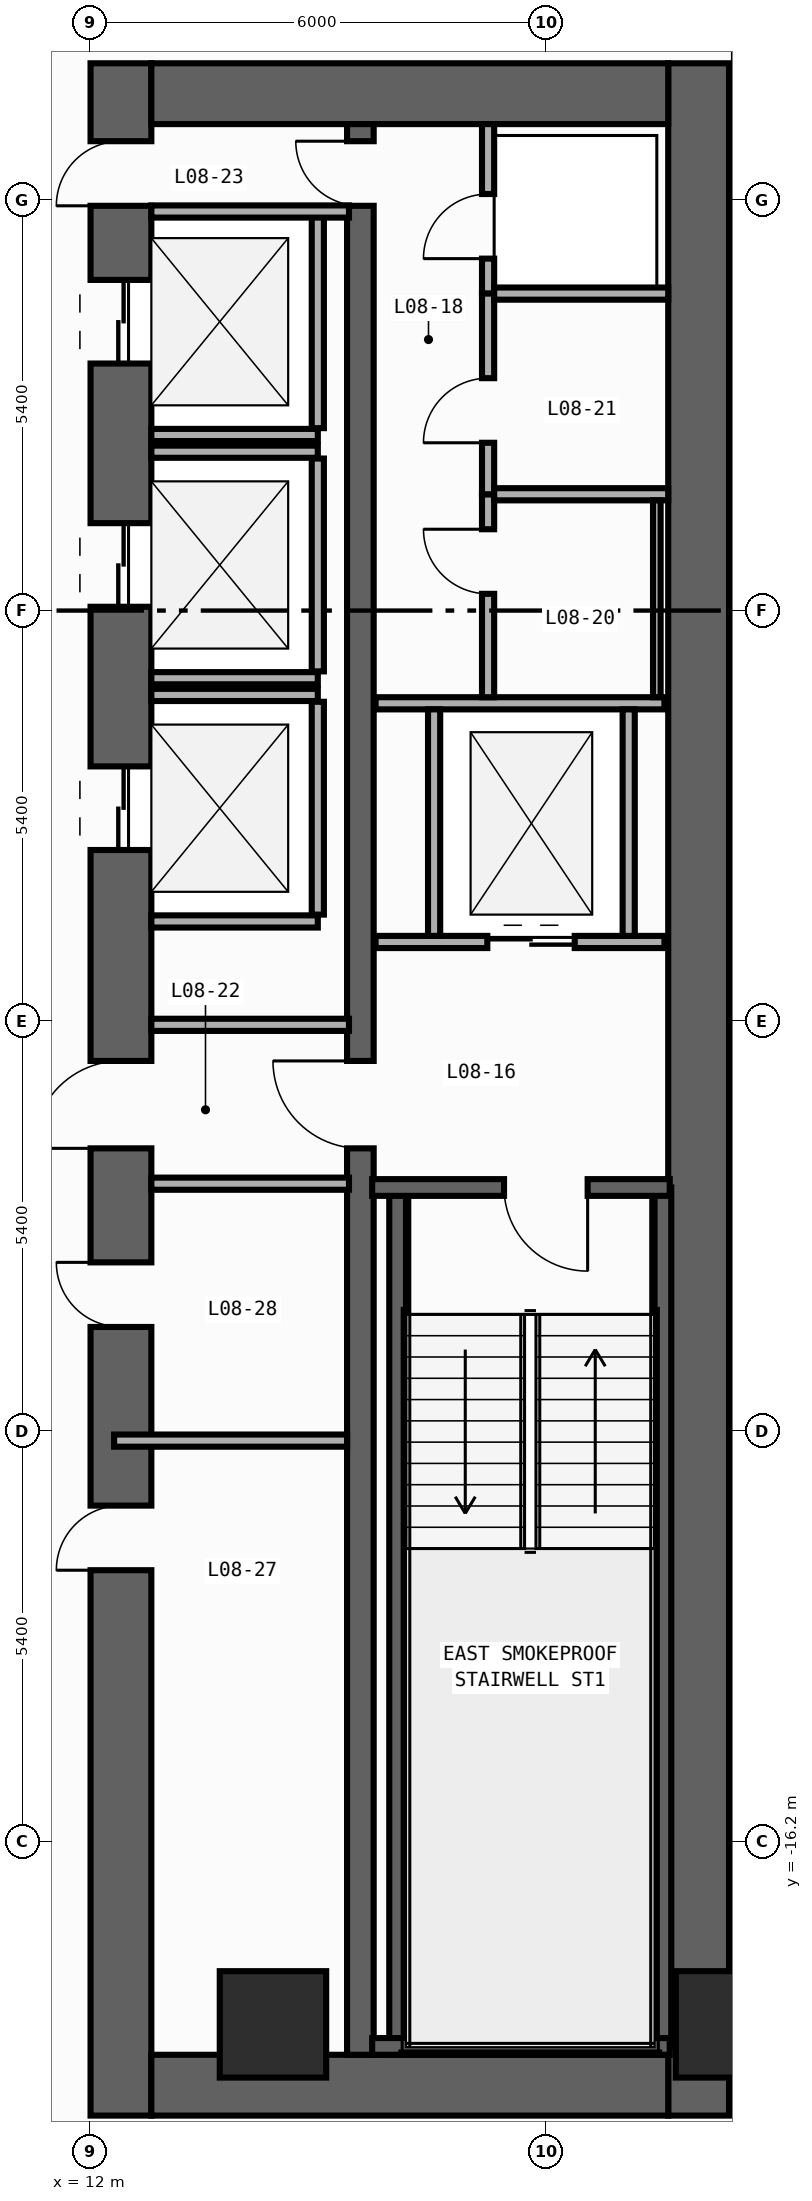
"""IFC4 building model, lengths in metres.
Left out: names, types, materials, properties, quantities, classifications, styles, units other than length and angle.
Written with IfcOpenShell. Run it as: python <this file> out.ifc"""

import sys

from ifc_helpers import new_model, si_unit, direction, frame, frame_2d, origin, origin_2d, place, context, subcontext, project, spatial, rectangle, extrude, element, fill, save


model = new_model("IFC4")
c1 = context("Model", 3, precision=1e-05, world=origin(), true_north=direction((0.0, 1.0)))
c2 = subcontext(c1, "Body", "Model", "MODEL_VIEW")
j1 = project(units=[si_unit("LENGTHUNIT", "METRE"), si_unit("PLANEANGLEUNIT", "RADIAN")], contexts=[c1])
p1 = place(None, origin())
s1 = spatial("IfcSite", under=j1, at=p1, CompositionType="ELEMENT")
p2 = place(p1, origin())
s2 = spatial("IfcBuilding", under=s1, at=p2, CompositionType="ELEMENT")
p3 = place(p2, frame((0.0, 0.0, 34.4)))
s3 = spatial("IfcBuildingStorey", under=s2, at=p3, CompositionType="ELEMENT", Elevation=34.4)
p4 = place(p3, frame((12.4, -19.8, 0.0), z_axis=(0.0, 0.0, 1.0), x_axis=(0.0, 1.0, 0.0)))
e1 = element("IfcWall", 1, at=p4, inside=s3, PredefinedType="SHEAR", context=c2, shape_type="SweptSolid", body=[
    extrude(rectangle(XDim=27.0, YDim=0.8, at=frame_2d((13.5, 0.0))), origin(), (0.0, 0.0, 1.0), 3.94),
])
p5 = place(p4, frame((23.05, 0.0, 0.0)))
e2 = element("IfcOpeningElement", 2, at=p5, cuts=e1, PredefinedType="OPENING", context=c2, shape_type="SweptSolid", body=[
    extrude(rectangle(XDim=1.1, YDim=2.2, at=frame_2d((0.55, 1.1))), frame((0.0, 0.41, 0.0), z_axis=(0.0, -1.0, 0.0), x_axis=(1.0, 0.0, 0.0)), (0.0, 0.0, 1.0), 0.82),
])
p6 = place(p4, frame((19.85, 0.0, 0.0)))
e3 = element("IfcOpeningElement", 3, at=p6, cuts=e1, PredefinedType="OPENING", context=c2, shape_type="SweptSolid", body=[
    extrude(rectangle(XDim=1.1, YDim=2.2, at=frame_2d((0.55, 1.1))), frame((0.0, 0.41, 0.0), z_axis=(0.0, -1.0, 0.0), x_axis=(1.0, 0.0, 0.0)), (0.0, 0.0, 1.0), 0.82),
])
p7 = place(p4, frame((16.65, 0.0, 0.0)))
e4 = element("IfcOpeningElement", 4, at=p7, cuts=e1, PredefinedType="OPENING", context=c2, shape_type="SweptSolid", body=[
    extrude(rectangle(XDim=1.1, YDim=2.2, at=frame_2d((0.55, 1.1))), frame((0.0, 0.41, 0.0), z_axis=(0.0, -1.0, 0.0), x_axis=(1.0, 0.0, 0.0)), (0.0, 0.0, 1.0), 0.82),
])
p8 = place(p4, frame((7.175, 0.0, 0.0)))
e5 = element("IfcOpeningElement", 5, at=p8, cuts=e1, PredefinedType="OPENING", context=c2, shape_type="SweptSolid", body=[
    extrude(rectangle(XDim=0.85, YDim=2.1, at=frame_2d((0.425, 1.05))), frame((0.0, 0.41, 0.0), z_axis=(0.0, -1.0, 0.0), x_axis=(1.0, 0.0, 0.0)), (0.0, 0.0, 1.0), 0.82),
])
p9 = place(p4, frame((10.375, 0.0, 0.0)))
e6 = element("IfcOpeningElement", 6, at=p9, cuts=e1, PredefinedType="OPENING", context=c2, shape_type="SweptSolid", body=[
    extrude(rectangle(XDim=0.85, YDim=2.1, at=frame_2d((0.425, 1.05))), frame((0.0, 0.41, 0.0), z_axis=(0.0, -1.0, 0.0), x_axis=(1.0, 0.0, 0.0)), (0.0, 0.0, 1.0), 0.82),
])
p10 = place(p4, frame((12.725, 0.0, 0.0)))
e7 = element("IfcOpeningElement", 7, at=p10, cuts=e1, PredefinedType="OPENING", context=c2, shape_type="SweptSolid", body=[
    extrude(rectangle(XDim=1.15, YDim=2.2, at=frame_2d((0.575, 1.1))), frame((0.0, 0.41, 0.0), z_axis=(0.0, -1.0, 0.0), x_axis=(1.0, 0.0, 0.0)), (0.0, 0.0, 1.0), 0.82),
])
p11 = place(p4, frame((25.125, 0.0, 0.0)))
e8 = element("IfcOpeningElement", 8, at=p11, cuts=e1, PredefinedType="OPENING", context=c2, shape_type="SweptSolid", body=[
    extrude(rectangle(XDim=0.85, YDim=2.1, at=frame_2d((0.425, 1.05))), frame((0.0, 0.41, 0.0), z_axis=(0.0, -1.0, 0.0), x_axis=(1.0, 0.0, 0.0)), (0.0, 0.0, 1.0), 0.82),
])
p12 = place(p3, frame((20.0, -19.8, 0.0), z_axis=(0.0, 0.0, 1.0), x_axis=(0.0, 1.0, 0.0)))
e9 = element("IfcWall", 9, at=p12, inside=s3, PredefinedType="SHEAR", context=c2, shape_type="SweptSolid", body=[
    extrude(rectangle(XDim=27.0, YDim=0.8, at=frame_2d((13.5, 0.0))), origin(), (0.0, 0.0, 1.0), 3.94),
])
for number, where, z_axis, x_axis in (
    (10, (12.8, -19.4, 0.0), (0.0, 0.0, 1.0), (1.0, 0.0, 0.0)),
    (11, (12.8, 6.8, 0.0), (0.0, 0.0, 1.0), (1.0, 0.0, 0.0)),
):
    element("IfcWall", number, at=place(p3, frame(where, z_axis=z_axis, x_axis=x_axis)), inside=s3, PredefinedType="SHEAR", context=c2, shape_type="SweptSolid", body=[
        extrude(rectangle(XDim=6.8, YDim=0.8, at=frame_2d((3.4, 0.0))), origin(), (0.0, 0.0, 1.0), 3.94),
    ])
p13 = place(p3, frame((15.55, -19.0, 0.0), z_axis=(0.0, 0.0, 1.0), x_axis=(0.0, 1.0, 0.0)))
e12 = element("IfcWall", 12, at=p13, inside=s3, PredefinedType="SHEAR", context=c2, shape_type="SweptSolid", body=[
    extrude(rectangle(XDim=25.4, YDim=0.35, at=frame_2d((12.7, 0.0))), origin(), (0.0, 0.0, 1.0), 3.94),
])
p14 = place(p13, frame((11.925, 0.0, 0.0)))
e13 = element("IfcOpeningElement", 13, at=p14, cuts=e12, PredefinedType="OPENING", context=c2, shape_type="SweptSolid", body=[
    extrude(rectangle(XDim=1.15, YDim=2.2, at=frame_2d((0.575, 1.1))), frame((0.0, 0.185, 0.0), z_axis=(0.0, -1.0, 0.0), x_axis=(1.0, 0.0, 0.0)), (0.0, 0.0, 1.0), 0.37),
])
p15 = place(p13, frame((24.325, 0.0, 0.0)))
e14 = element("IfcOpeningElement", 14, at=p15, cuts=e12, PredefinedType="OPENING", context=c2, shape_type="SweptSolid", body=[
    extrude(rectangle(XDim=0.85, YDim=2.1, at=frame_2d((0.425, 1.05))), frame((0.0, 0.185, 0.0), z_axis=(0.0, -1.0, 0.0), x_axis=(1.0, 0.0, 0.0)), (0.0, 0.0, 1.0), 0.37),
])
for number, where, z_axis, x_axis in (
    (15, (16.04, -18.89, 0.0), (0.0, 0.0, 1.0), (0.0, 1.0, 0.0)),
    (16, (19.53, -18.89, 0.0), (0.0, 0.0, 1.0), (0.0, 1.0, 0.0)),
):
    element("IfcWall", number, at=place(p3, frame(where, z_axis=z_axis, x_axis=x_axis)), inside=s3, PredefinedType="SHEAR", context=c2, shape_type="SweptSolid", body=[
        extrude(rectangle(XDim=11.3, YDim=0.22, at=frame_2d((5.65, 0.0))), origin(), (0.0, 0.0, 1.0), 3.94),
    ])
p16 = place(p3, frame((15.705, -18.89, 0.0), z_axis=(0.0, 0.0, 1.0), x_axis=(1.0, 0.0, 0.0)))
e17 = element("IfcWall", 17, at=p16, inside=s3, PredefinedType="SHEAR", context=c2, shape_type="SweptSolid", body=[
    extrude(rectangle(XDim=3.915, YDim=0.22, at=frame_2d((1.958, 0.0))), origin(), (0.0, 0.0, 1.0), 3.94),
])
p17 = place(p3, frame((19.62, -7.59, 0.0), z_axis=(0.0, 0.0, 1.0), x_axis=(-1.0, 0.0, 0.0)))
e18 = element("IfcWall", 18, at=p17, inside=s3, PredefinedType="SHEAR", context=c2, shape_type="SweptSolid", body=[
    extrude(rectangle(XDim=3.915, YDim=0.22, at=frame_2d((1.958, 0.0))), origin(), (0.0, 0.0, 1.0), 3.94),
])
p18 = place(p17, frame((1.08, 0.0, 0.0)))
e19 = element("IfcOpeningElement", 19, at=p18, cuts=e18, PredefinedType="OPENING", context=c2, shape_type="SweptSolid", body=[
    extrude(rectangle(XDim=1.1, YDim=2.2, at=frame_2d((0.55, 1.1))), frame((0.0, 0.12, 0.0), z_axis=(0.0, -1.0, 0.0), x_axis=(1.0, 0.0, 0.0)), (0.0, 0.0, 1.0), 0.24),
])
for number, where, z_axis, x_axis in (
    (20, (20.4, -18.6, 0.0), (0.0, 0.0, 1.0), (1.0, 0.0, 0.0)),
    (21, (14.4, -18.6, 0.0), (0.0, 0.0, 1.0), (1.0, 0.0, 0.0)),
):
    element("IfcColumn", number, at=place(p3, frame(where, z_axis=z_axis, x_axis=x_axis)), inside=s3, PredefinedType="COLUMN", context=c2, shape_type="SweptSolid", body=[
        extrude(rectangle(XDim=1.4, YDim=1.4, at=origin_2d()), origin(), (0.0, 0.0, 1.0), 4.2),
    ])
p19 = place(p3, frame((12.8, 2.31, 0.0), z_axis=(0.0, 0.0, 1.0), x_axis=(1.0, 0.0, 0.0)))
e22 = element("IfcWall", 22, at=p19, inside=s3, PredefinedType="STANDARD", context=c2, shape_type="SweptSolid", body=[
    extrude(rectangle(XDim=2.19, YDim=0.16, at=frame_2d((1.095, 0.0))), origin(), (0.0, 0.0, 1.0), 3.94),
])
p20 = place(p3, frame((14.99, 2.4, 0.0), z_axis=(0.0, 0.0, 1.0), x_axis=(0.0, 1.0, 0.0)))
e23 = element("IfcWall", 23, at=p20, inside=s3, PredefinedType="STANDARD", context=c2, shape_type="SweptSolid", body=[
    extrude(rectangle(XDim=2.8, YDim=0.16, at=frame_2d((1.4, 0.0))), origin(), (0.0, 0.0, 1.0), 3.94),
])
for number, where, z_axis, x_axis in (
    (24, (12.8, -0.89, 0.0), (0.0, 0.0, 1.0), (1.0, 0.0, 0.0)),
    (25, (12.8, 2.09, 0.0), (0.0, 0.0, 1.0), (1.0, 0.0, 0.0)),
):
    element("IfcWall", number, at=place(p3, frame(where, z_axis=z_axis, x_axis=x_axis)), inside=s3, PredefinedType="STANDARD", context=c2, shape_type="SweptSolid", body=[
        extrude(rectangle(XDim=2.19, YDim=0.16, at=frame_2d((1.095, 0.0))), origin(), (0.0, 0.0, 1.0), 3.94),
    ])
p21 = place(p3, frame((14.99, -0.8, 0.0), z_axis=(0.0, 0.0, 1.0), x_axis=(0.0, 1.0, 0.0)))
e26 = element("IfcWall", 26, at=p21, inside=s3, PredefinedType="STANDARD", context=c2, shape_type="SweptSolid", body=[
    extrude(rectangle(XDim=2.8, YDim=0.16, at=frame_2d((1.4, 0.0))), origin(), (0.0, 0.0, 1.0), 3.94),
])
for number, where, z_axis, x_axis in (
    (27, (12.8, -4.09, 0.0), (0.0, 0.0, 1.0), (1.0, 0.0, 0.0)),
    (28, (12.8, -1.11, 0.0), (0.0, 0.0, 1.0), (1.0, 0.0, 0.0)),
):
    element("IfcWall", number, at=place(p3, frame(where, z_axis=z_axis, x_axis=x_axis)), inside=s3, PredefinedType="STANDARD", context=c2, shape_type="SweptSolid", body=[
        extrude(rectangle(XDim=2.19, YDim=0.16, at=frame_2d((1.095, 0.0))), origin(), (0.0, 0.0, 1.0), 3.94),
    ])
p22 = place(p3, frame((14.99, -4.0, 0.0), z_axis=(0.0, 0.0, 1.0), x_axis=(0.0, 1.0, 0.0)))
e29 = element("IfcWall", 29, at=p22, inside=s3, PredefinedType="STANDARD", context=c2, shape_type="SweptSolid", body=[
    extrude(rectangle(XDim=2.8, YDim=0.16, at=frame_2d((1.4, 0.0))), origin(), (0.0, 0.0, 1.0), 3.94),
])
p23 = place(p3, frame((15.75, -4.36, 0.0), z_axis=(0.0, 0.0, 1.0), x_axis=(1.0, 0.0, 0.0)))
e30 = element("IfcWall", 30, at=p23, inside=s3, PredefinedType="STANDARD", context=c2, shape_type="SweptSolid", body=[
    extrude(rectangle(XDim=3.8, YDim=0.16, at=frame_2d((1.9, 0.0))), origin(), (0.0, 0.0, 1.0), 3.94),
])
p24 = place(p23, frame((1.47, 0.0, 0.0)))
e31 = element("IfcOpeningElement", 31, at=p24, cuts=e30, PredefinedType="OPENING", context=c2, shape_type="SweptSolid", body=[
    extrude(rectangle(XDim=1.15, YDim=2.2, at=frame_2d((0.575, 1.1))), frame((0.0, 0.09, 0.0), z_axis=(0.0, -1.0, 0.0), x_axis=(1.0, 0.0, 0.0)), (0.0, 0.0, 1.0), 0.18),
])
p25 = place(p3, frame((15.75, -1.22, 0.0), z_axis=(0.0, 0.0, 1.0), x_axis=(1.0, 0.0, 0.0)))
e32 = element("IfcWall", 32, at=p25, inside=s3, PredefinedType="STANDARD", context=c2, shape_type="SweptSolid", body=[
    extrude(rectangle(XDim=3.8, YDim=0.16, at=frame_2d((1.9, 0.0))), origin(), (0.0, 0.0, 1.0), 3.94),
])
for number, where, z_axis, x_axis in (
    (33, (16.52, -4.28, 0.0), (0.0, 0.0, 1.0), (0.0, 1.0, 0.0)),
    (34, (19.08, -4.28, 0.0), (0.0, 0.0, 1.0), (0.0, 1.0, 0.0)),
):
    element("IfcWall", number, at=place(p3, frame(where, z_axis=z_axis, x_axis=x_axis)), inside=s3, PredefinedType="STANDARD", context=c2, shape_type="SweptSolid", body=[
        extrude(rectangle(XDim=2.98, YDim=0.16, at=frame_2d((1.49, 0.0))), origin(), (0.0, 0.0, 1.0), 3.94),
    ])
for number, where, z_axis, x_axis in (
    (35, (12.8, -5.45, 0.0), (0.0, 0.0, 1.0), (1.0, 0.0, 0.0)),
    (36, (12.8, -7.54, 0.0), (0.0, 0.0, 1.0), (1.0, 0.0, 0.0)),
    (37, (12.8, 5.25, 0.0), (0.0, 0.0, 1.0), (1.0, 0.0, 0.0)),
):
    element("IfcWall", number, at=place(p3, frame(where, z_axis=z_axis, x_axis=x_axis)), inside=s3, PredefinedType="STANDARD", context=c2, shape_type="SweptSolid", body=[
        extrude(rectangle(XDim=2.6, YDim=0.16, at=frame_2d((1.3, 0.0))), origin(), (0.0, 0.0, 1.0), 3.94),
    ])
p26 = place(p3, frame((17.23, 4.17, 0.0), z_axis=(0.0, 0.0, 1.0), x_axis=(0.0, 1.0, 0.0)))
e38 = element("IfcWall", 38, at=p26, inside=s3, PredefinedType="PARTITIONING", context=c2, shape_type="SweptSolid", body=[
    extrude(rectangle(XDim=2.23, YDim=0.16, at=frame_2d((1.115, 0.0))), origin(), (0.0, 0.0, 1.0), 3.94),
])
p27 = place(p26, frame((0.46, 0.0, 0.0)))
e39 = element("IfcOpeningElement", 39, at=p27, cuts=e38, PredefinedType="OPENING", context=c2, shape_type="SweptSolid", body=[
    extrude(rectangle(XDim=0.85, YDim=2.1, at=frame_2d((0.425, 1.05))), frame((0.0, 0.09, 0.0), z_axis=(0.0, -1.0, 0.0), x_axis=(1.0, 0.0, 0.0)), (0.0, 0.0, 1.0), 0.18),
])
p28 = place(p3, frame((17.23, -1.14, 0.0), z_axis=(0.0, 0.0, 1.0), x_axis=(0.0, 1.0, 0.0)))
e40 = element("IfcWall", 40, at=p28, inside=s3, PredefinedType="PARTITIONING", context=c2, shape_type="SweptSolid", body=[
    extrude(rectangle(XDim=2.67, YDim=0.16, at=frame_2d((1.335, 0.0))), origin(), (0.0, 0.0, 1.0), 3.94),
])
p29 = place(p28, frame((1.36, 0.0, 0.0)))
e41 = element("IfcOpeningElement", 41, at=p29, cuts=e40, PredefinedType="OPENING", context=c2, shape_type="SweptSolid", body=[
    extrude(rectangle(XDim=0.85, YDim=2.1, at=frame_2d((0.425, 1.05))), frame((0.0, 0.09, 0.0), z_axis=(0.0, -1.0, 0.0), x_axis=(1.0, 0.0, 0.0)), (0.0, 0.0, 1.0), 0.18),
])
p30 = place(p3, frame((17.23, 1.53, 0.0), z_axis=(0.0, 0.0, 1.0), x_axis=(0.0, 1.0, 0.0)))
e42 = element("IfcWall", 42, at=p30, inside=s3, PredefinedType="PARTITIONING", context=c2, shape_type="SweptSolid", body=[
    extrude(rectangle(XDim=2.64, YDim=0.16, at=frame_2d((1.32, 0.0))), origin(), (0.0, 0.0, 1.0), 3.94),
])
p31 = place(p30, frame((0.677, 0.0, 0.0)))
e43 = element("IfcOpeningElement", 43, at=p31, cuts=e42, PredefinedType="OPENING", context=c2, shape_type="SweptSolid", body=[
    extrude(rectangle(XDim=0.85, YDim=2.1, at=frame_2d((0.425, 1.05))), frame((0.0, 0.09, 0.0), z_axis=(0.0, -1.0, 0.0), x_axis=(1.0, 0.0, 0.0)), (0.0, 0.0, 1.0), 0.18),
])
for number, where, z_axis, x_axis in (
    (44, (17.31, 4.17, 0.0), (0.0, 0.0, 1.0), (1.0, 0.0, 0.0)),
    (45, (17.31, 1.53, 0.0), (0.0, 0.0, 1.0), (1.0, 0.0, 0.0)),
):
    element("IfcWall", number, at=place(p3, frame(where, z_axis=z_axis, x_axis=x_axis)), inside=s3, PredefinedType="PARTITIONING", context=c2, shape_type="SweptSolid", body=[
        extrude(rectangle(XDim=2.29, YDim=0.16, at=frame_2d((1.145, 0.0))), origin(), (0.0, 0.0, 1.0), 3.94),
    ])
p32 = place(p3, frame((12.31, -10.92, 0.0), z_axis=(0.0, 0.0, 1.0), x_axis=(1.0, 0.0, 0.0)))
e46 = element("IfcWall", 46, at=p32, inside=s3, PredefinedType="PARTITIONING", context=c2, shape_type="SweptSolid", body=[
    extrude(rectangle(XDim=3.065, YDim=0.16, at=frame_2d((1.532, 0.0))), origin(), (0.0, 0.0, 1.0), 3.14),
])
p33 = place(p3, frame((19.45, 1.45, 0.0), z_axis=(0.0, 0.0, 1.0), x_axis=(0.0, -1.0, 0.0)))
e47 = element("IfcWall", 47, at=p33, inside=s3, PredefinedType="PARTITIONING", context=c2, shape_type="SweptSolid", body=[
    extrude(rectangle(XDim=2.59, YDim=0.1, at=frame_2d((1.295, 0.0))), origin(), (0.0, 0.0, 1.0), 3.94),
])
p34 = place(p18, origin())
e48 = element("IfcDoor", 48, at=p34, inside=s3, OperationType="SINGLE_SWING_LEFT", PredefinedType="DOOR", context=c2, shape_type="SweptSolid", body=[
    extrude(rectangle(XDim=1.1, YDim=2.2, at=frame_2d((0.55, 1.1))), frame((0.0, 0.025, 0.0), z_axis=(0.0, -1.0, 0.0), x_axis=(1.0, 0.0, 0.0)), (0.0, 0.0, 1.0), 0.05),
])
fill(e19, e48)
p35 = place(p5, origin())
e49 = element("IfcDoor", 49, at=p35, inside=s3, OperationType="DOUBLE_DOOR_SLIDING", PredefinedType="DOOR", context=c2, shape_type="SweptSolid", body=[
    extrude(rectangle(XDim=1.1, YDim=2.2, at=frame_2d((0.55, 1.1))), frame((0.0, 0.025, 0.0), z_axis=(0.0, -1.0, 0.0), x_axis=(1.0, 0.0, 0.0)), (0.0, 0.0, 1.0), 0.05),
])
fill(e2, e49)
p36 = place(p6, origin())
e50 = element("IfcDoor", 50, at=p36, inside=s3, OperationType="DOUBLE_DOOR_SLIDING", PredefinedType="DOOR", context=c2, shape_type="SweptSolid", body=[
    extrude(rectangle(XDim=1.1, YDim=2.2, at=frame_2d((0.55, 1.1))), frame((0.0, 0.025, 0.0), z_axis=(0.0, -1.0, 0.0), x_axis=(1.0, 0.0, 0.0)), (0.0, 0.0, 1.0), 0.05),
])
fill(e3, e50)
p37 = place(p7, origin())
e51 = element("IfcDoor", 51, at=p37, inside=s3, OperationType="DOUBLE_DOOR_SLIDING", PredefinedType="DOOR", context=c2, shape_type="SweptSolid", body=[
    extrude(rectangle(XDim=1.1, YDim=2.2, at=frame_2d((0.55, 1.1))), frame((0.0, 0.025, 0.0), z_axis=(0.0, -1.0, 0.0), x_axis=(1.0, 0.0, 0.0)), (0.0, 0.0, 1.0), 0.05),
])
fill(e4, e51)
p38 = place(p8, origin())
e52 = element("IfcDoor", 52, at=p38, inside=s3, OperationType="SINGLE_SWING_LEFT", PredefinedType="DOOR", context=c2, shape_type="SweptSolid", body=[
    extrude(rectangle(XDim=0.85, YDim=2.1, at=frame_2d((0.425, 1.05))), frame((0.0, 0.025, 0.0), z_axis=(0.0, -1.0, 0.0), x_axis=(1.0, 0.0, 0.0)), (0.0, 0.0, 1.0), 0.05),
])
fill(e5, e52)
p39 = place(p9, origin())
e53 = element("IfcDoor", 53, at=p39, inside=s3, OperationType="SINGLE_SWING_RIGHT", PredefinedType="DOOR", context=c2, shape_type="SweptSolid", body=[
    extrude(rectangle(XDim=0.85, YDim=2.1, at=frame_2d((0.425, 1.05))), frame((0.0, 0.025, 0.0), z_axis=(0.0, -1.0, 0.0), x_axis=(1.0, 0.0, 0.0)), (0.0, 0.0, 1.0), 0.05),
])
fill(e6, e53)
p40 = place(p10, origin())
e54 = element("IfcDoor", 54, at=p40, inside=s3, OperationType="SINGLE_SWING_LEFT", PredefinedType="DOOR", context=c2, shape_type="SweptSolid", body=[
    extrude(rectangle(XDim=1.15, YDim=2.2, at=frame_2d((0.575, 1.1))), frame((0.0, 0.025, 0.0), z_axis=(0.0, -1.0, 0.0), x_axis=(1.0, 0.0, 0.0)), (0.0, 0.0, 1.0), 0.05),
])
fill(e7, e54)
p41 = place(p14, origin())
e55 = element("IfcDoor", 55, at=p41, inside=s3, OperationType="SINGLE_SWING_RIGHT", PredefinedType="DOOR", context=c2, shape_type="SweptSolid", body=[
    extrude(rectangle(XDim=1.15, YDim=2.2, at=frame_2d((0.575, 1.1))), frame((0.0, 0.025, 0.0), z_axis=(0.0, -1.0, 0.0), x_axis=(1.0, 0.0, 0.0)), (0.0, 0.0, 1.0), 0.05),
])
fill(e13, e55)
p42 = place(p11, origin())
e56 = element("IfcDoor", 56, at=p42, inside=s3, OperationType="SINGLE_SWING_LEFT", PredefinedType="DOOR", context=c2, shape_type="SweptSolid", body=[
    extrude(rectangle(XDim=0.85, YDim=2.1, at=frame_2d((0.425, 1.05))), frame((0.0, 0.025, 0.0), z_axis=(0.0, -1.0, 0.0), x_axis=(1.0, 0.0, 0.0)), (0.0, 0.0, 1.0), 0.05),
])
fill(e8, e56)
p43 = place(p15, origin())
e57 = element("IfcDoor", 57, at=p43, inside=s3, OperationType="SINGLE_SWING_RIGHT", PredefinedType="DOOR", context=c2, shape_type="SweptSolid", body=[
    extrude(rectangle(XDim=0.85, YDim=2.1, at=frame_2d((0.425, 1.05))), frame((0.0, 0.025, 0.0), z_axis=(0.0, -1.0, 0.0), x_axis=(1.0, 0.0, 0.0)), (0.0, 0.0, 1.0), 0.05),
])
fill(e14, e57)
p44 = place(p24, origin())
e58 = element("IfcDoor", 58, at=p44, inside=s3, OperationType="DOUBLE_DOOR_SLIDING", PredefinedType="DOOR", context=c2, shape_type="SweptSolid", body=[
    extrude(rectangle(XDim=1.15, YDim=2.2, at=frame_2d((0.575, 1.1))), frame((0.0, 0.025, 0.0), z_axis=(0.0, -1.0, 0.0), x_axis=(1.0, 0.0, 0.0)), (0.0, 0.0, 1.0), 0.05),
])
fill(e31, e58)
p45 = place(p27, origin())
e59 = element("IfcDoor", 59, at=p45, inside=s3, OperationType="SINGLE_SWING_LEFT", PredefinedType="DOOR", context=c2, shape_type="SweptSolid", body=[
    extrude(rectangle(XDim=0.85, YDim=2.1, at=frame_2d((0.425, 1.05))), frame((0.0, 0.025, 0.0), z_axis=(0.0, -1.0, 0.0), x_axis=(1.0, 0.0, 0.0)), (0.0, 0.0, 1.0), 0.05),
])
fill(e39, e59)
p46 = place(p29, origin())
e60 = element("IfcDoor", 60, at=p46, inside=s3, OperationType="SINGLE_SWING_RIGHT", PredefinedType="DOOR", context=c2, shape_type="SweptSolid", body=[
    extrude(rectangle(XDim=0.85, YDim=2.1, at=frame_2d((0.425, 1.05))), frame((0.0, 0.025, 0.0), z_axis=(0.0, -1.0, 0.0), x_axis=(1.0, 0.0, 0.0)), (0.0, 0.0, 1.0), 0.05),
])
fill(e41, e60)
p47 = place(p31, origin())
e61 = element("IfcDoor", 61, at=p47, inside=s3, OperationType="SINGLE_SWING_LEFT", PredefinedType="DOOR", context=c2, shape_type="SweptSolid", body=[
    extrude(rectangle(XDim=0.85, YDim=2.1, at=frame_2d((0.425, 1.05))), frame((0.0, 0.025, 0.0), z_axis=(0.0, -1.0, 0.0), x_axis=(1.0, 0.0, 0.0)), (0.0, 0.0, 1.0), 0.05),
])
fill(e43, e61)
save(model, sys.argv[1])
